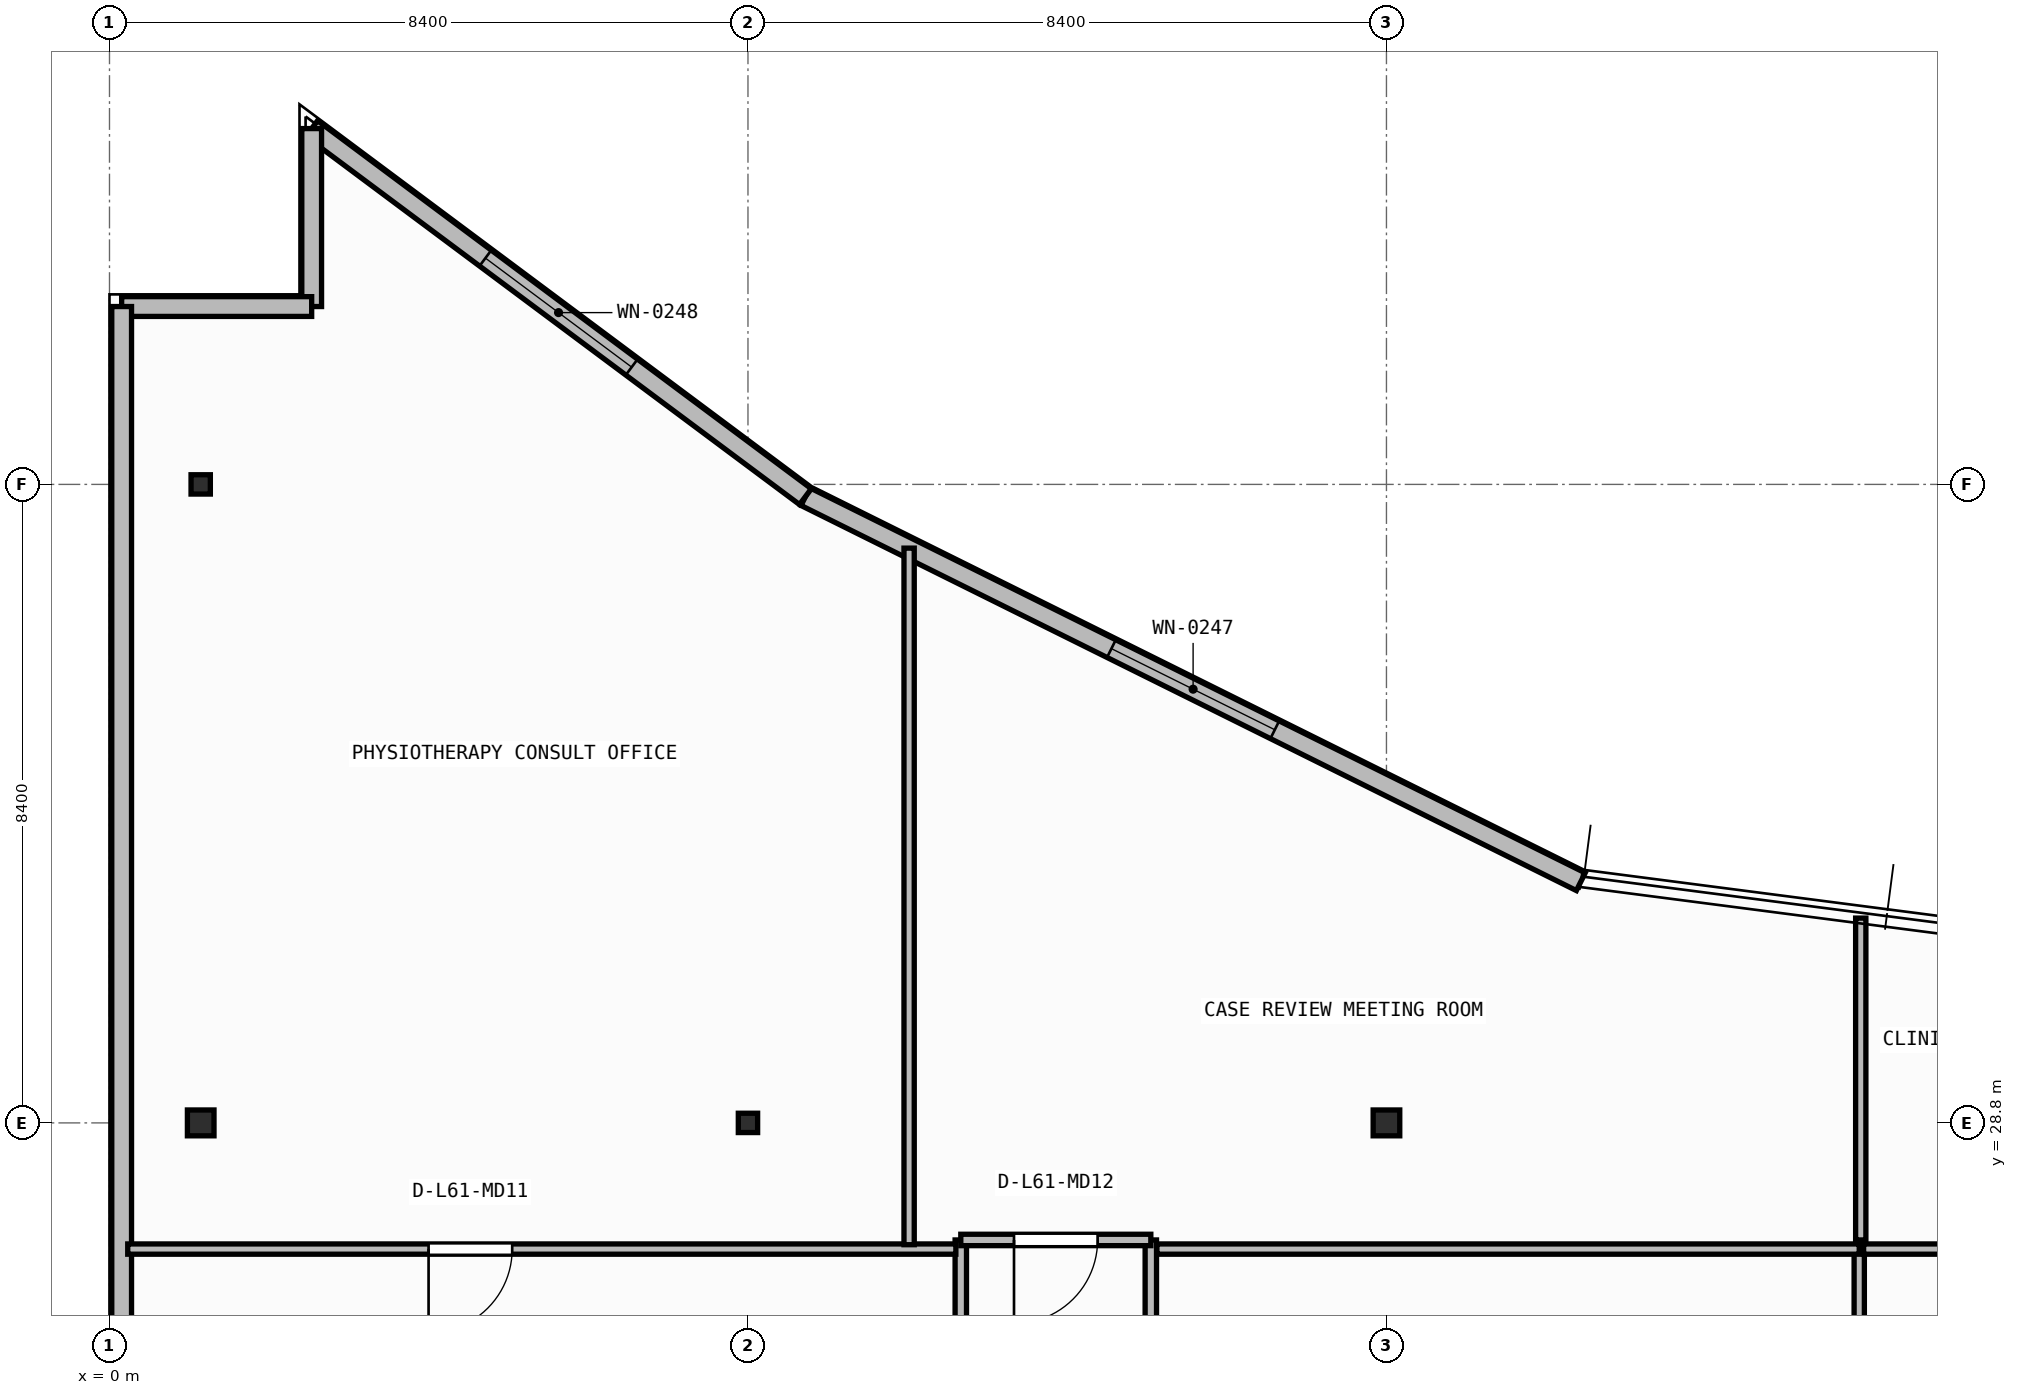
"""IFC4 building model, lengths in metres.
Left out: names, types, materials, properties, quantities, classifications, styles, units other than length and angle.
Written with IfcOpenShell. Run it as: python <this file> out.ifc"""

import sys

from ifc_helpers import new_model, si_unit, direction, frame, frame_2d, origin, origin_2d, place, context, subcontext, project, spatial, rectangle, i_section, extrude, element, fill, save


model = new_model("IFC4")
c1 = context("Model", 3, precision=1e-05, world=origin(), true_north=direction((0.0, 1.0)))
c2 = subcontext(c1, "Body", "Model", "MODEL_VIEW")
j1 = project(units=[si_unit("LENGTHUNIT", "METRE"), si_unit("PLANEANGLEUNIT", "RADIAN")], contexts=[c1])
p1 = place(None, origin())
s1 = spatial("IfcSite", under=j1, at=p1, CompositionType="ELEMENT")
p2 = place(p1, origin())
s2 = spatial("IfcBuilding", under=s1, at=p2, CompositionType="ELEMENT")
p3 = place(p2, frame((0.0, 0.0, 248.65)))
s3 = spatial("IfcBuildingStorey", under=s2, at=p3, CompositionType="ELEMENT", Elevation=248.65)
p4 = place(p3, frame((1.2, 28.8, 0.0), z_axis=(0.0, 0.0, 1.0), x_axis=(1.0, 0.0, 0.0)))
e1 = element("IfcColumn", 1, at=p4, inside=s3, PredefinedType="COLUMN", context=c2, shape_type="SweptSolid", body=[
    extrude(i_section(OverallWidth=0.35, OverallDepth=0.34, WebThickness=0.016, FlangeThickness=0.028, at=origin_2d()), origin(), (0.0, 0.0, 1.0), 3.95),
])
p5 = place(p3, frame((8.4, 28.8, 0.0), z_axis=(0.0, 0.0, 1.0), x_axis=(1.0, 0.0, 0.0)))
e2 = element("IfcColumn", 2, at=p5, inside=s3, PredefinedType="COLUMN", context=c2, shape_type="SweptSolid", body=[
    extrude(i_section(OverallWidth=0.254, OverallDepth=0.254, WebThickness=0.009, FlangeThickness=0.014, FilletRadius=0.013, at=origin_2d()), origin(), (0.0, 0.0, 1.0), 3.95),
])
p6 = place(p3, frame((16.8, 28.8, 0.0), z_axis=(0.0, 0.0, 1.0), x_axis=(1.0, 0.0, 0.0)))
e3 = element("IfcColumn", 3, at=p6, inside=s3, PredefinedType="COLUMN", context=c2, shape_type="SweptSolid", body=[
    extrude(i_section(OverallWidth=0.35, OverallDepth=0.34, WebThickness=0.016, FlangeThickness=0.028, at=origin_2d()), origin(), (0.0, 0.0, 1.0), 3.95),
])
p7 = place(p3, frame((1.2, 37.2, 0.0), z_axis=(0.0, 0.0, 1.0), x_axis=(1.0, 0.0, 0.0)))
e4 = element("IfcColumn", 4, at=p7, inside=s3, PredefinedType="COLUMN", context=c2, shape_type="SweptSolid", body=[
    extrude(i_section(OverallWidth=0.254, OverallDepth=0.254, WebThickness=0.009, FlangeThickness=0.014, FilletRadius=0.013, at=origin_2d()), origin(), (0.0, 0.0, 1.0), 3.95),
])
p8 = place(p3, frame((19.357, 31.973, 0.0), z_axis=(0.0, 0.0, 1.0), x_axis=(-0.895624365378, 0.444811191565, 0.0)))
e5 = element("IfcWall", 5, at=p8, inside=s3, PredefinedType="STANDARD", context=c2, shape_type="SweptSolid", body=[
    extrude(rectangle(XDim=11.389, YDim=0.26, at=frame_2d((5.695, 0.0))), origin(), (0.0, 0.0, 1.0), 3.71),
])
p9 = place(p8, frame((4.495, 0.0, 0.9)))
e6 = element("IfcOpeningElement", 6, at=p9, cuts=e5, PredefinedType="OPENING", context=c2, shape_type="SweptSolid", body=[
    extrude(rectangle(XDim=2.4, YDim=1.65, at=frame_2d((1.2, 0.825))), frame((0.0, 0.14, 0.0), z_axis=(0.0, -1.0, 0.0), x_axis=(1.0, 0.0, 0.0)), (0.0, 0.0, 1.0), 0.28),
])
p10 = place(p3, frame((9.156, 37.039, 0.0), z_axis=(0.0, 0.0, 1.0), x_axis=(-0.801775528243, 0.597625302602, 0.0)))
e7 = element("IfcWall", 7, at=p10, inside=s3, PredefinedType="STANDARD", context=c2, shape_type="SweptSolid", body=[
    extrude(rectangle(XDim=8.102, YDim=0.26, at=frame_2d((4.051, 0.0))), origin(), (0.0, 0.0, 1.0), 3.71),
])
p11 = place(p10, frame((2.851, 0.0, 0.9)))
e8 = element("IfcOpeningElement", 8, at=p11, cuts=e7, PredefinedType="OPENING", context=c2, shape_type="SweptSolid", body=[
    extrude(rectangle(XDim=2.4, YDim=1.65, at=frame_2d((1.2, 0.825))), frame((0.0, 0.14, 0.0), z_axis=(0.0, -1.0, 0.0), x_axis=(1.0, 0.0, 0.0)), (0.0, 0.0, 1.0), 0.28),
])
p12 = place(p3, frame((2.66, 41.881, 0.0), z_axis=(0.0, 0.0, 1.0), x_axis=(0.0, -1.0, 0.0)))
e9 = element("IfcWall", 9, at=p12, inside=s3, PredefinedType="STANDARD", context=c2, shape_type="SweptSolid", body=[
    extrude(rectangle(XDim=2.341, YDim=0.26, at=frame_2d((1.17, 0.0))), origin(), (0.0, 0.0, 1.0), 3.71),
])
p13 = place(p3, frame((2.66, 39.54, 0.0), z_axis=(0.0, 0.0, 1.0), x_axis=(-1.0, 0.0, 0.0)))
e10 = element("IfcWall", 10, at=p13, inside=s3, PredefinedType="STANDARD", context=c2, shape_type="SweptSolid", body=[
    extrude(rectangle(XDim=2.5, YDim=0.26, at=frame_2d((1.25, 0.0))), origin(), (0.0, 0.0, 1.0), 3.71),
])
p14 = place(p3, frame((0.16, 39.54, 0.0), z_axis=(0.0, 0.0, 1.0), x_axis=(0.0, -1.0, 0.0)))
e11 = element("IfcWall", 11, at=p14, inside=s3, PredefinedType="STANDARD", context=c2, shape_type="SweptSolid", body=[
    extrude(rectangle(XDim=36.88, YDim=0.26, at=frame_2d((18.44, 0.0))), origin(), (0.0, 0.0, 1.0), 3.71),
])
p15 = place(p14, frame((26.625, 0.0, 0.9)))
e12 = element("IfcOpeningElement", 12, at=p15, cuts=e11, PredefinedType="OPENING", context=c2, shape_type="SweptSolid", body=[
    extrude(rectangle(XDim=2.4, YDim=1.65, at=frame_2d((1.2, 0.825))), frame((0.0, 0.14, 0.0), z_axis=(0.0, -1.0, 0.0), x_axis=(1.0, 0.0, 0.0)), (0.0, 0.0, 1.0), 0.28),
])
p16 = place(p3, frame((11.2, 27.26, 0.0), z_axis=(0.0, 0.0, 1.0), x_axis=(0.0, -1.0, 0.0)))
e13 = element("IfcWall", 13, at=p16, inside=s3, PredefinedType="PARTITIONING", context=c2, shape_type="SweptSolid", body=[
    extrude(rectangle(XDim=6.242, YDim=0.15, at=frame_2d((3.121, 0.0))), origin(), (0.0, 0.0, 1.0), 3.71),
])
p17 = place(p16, frame((2.571, 0.0, 0.0)))
e14 = element("IfcOpeningElement", 14, at=p17, cuts=e13, PredefinedType="OPENING", context=c2, shape_type="SweptSolid", body=[
    extrude(rectangle(XDim=1.1, YDim=2.1, at=frame_2d((0.55, 1.05))), frame((0.0, 0.085, 0.0), z_axis=(0.0, -1.0, 0.0), x_axis=(1.0, 0.0, 0.0)), (0.0, 0.0, 1.0), 0.17),
])
p18 = place(p3, frame((13.7, 21.018, 0.0), z_axis=(0.0, 0.0, 1.0), x_axis=(0.0, 1.0, 0.0)))
e15 = element("IfcWall", 15, at=p18, inside=s3, PredefinedType="PARTITIONING", context=c2, shape_type="SweptSolid", body=[
    extrude(rectangle(XDim=6.242, YDim=0.15, at=frame_2d((3.121, 0.0))), origin(), (0.0, 0.0, 1.0), 3.71),
])
p19 = place(p18, frame((2.571, 0.0, 0.0)))
e16 = element("IfcOpeningElement", 16, at=p19, cuts=e15, PredefinedType="OPENING", context=c2, shape_type="SweptSolid", body=[
    extrude(rectangle(XDim=1.1, YDim=2.1, at=frame_2d((0.55, 1.05))), frame((0.0, 0.085, 0.0), z_axis=(0.0, -1.0, 0.0), x_axis=(1.0, 0.0, 0.0)), (0.0, 0.0, 1.0), 0.17),
])
p20 = place(p3, frame((13.7, 27.26, 0.0), z_axis=(0.0, 0.0, 1.0), x_axis=(-1.0, 0.0, 0.0)))
e17 = element("IfcWall", 17, at=p20, inside=s3, PredefinedType="PARTITIONING", context=c2, shape_type="SweptSolid", body=[
    extrude(rectangle(XDim=2.5, YDim=0.15, at=frame_2d((1.25, 0.0))), origin(), (0.0, 0.0, 1.0), 3.71),
])
p21 = place(p20, frame((0.7, 0.0, 0.0)))
e18 = element("IfcOpeningElement", 18, at=p21, cuts=e17, PredefinedType="OPENING", context=c2, shape_type="SweptSolid", body=[
    extrude(rectangle(XDim=1.1, YDim=2.1, at=frame_2d((0.55, 1.05))), frame((0.0, 0.085, 0.0), z_axis=(0.0, -1.0, 0.0), x_axis=(1.0, 0.0, 0.0)), (0.0, 0.0, 1.0), 0.17),
])
p22 = place(p3, frame((11.135, 27.14, 0.0), z_axis=(0.0, 0.0, 1.0), x_axis=(-1.0, 0.0, 0.0)))
e19 = element("IfcWall", 19, at=p22, inside=s3, PredefinedType="PARTITIONING", context=c2, shape_type="SweptSolid", body=[
    extrude(rectangle(XDim=10.895, YDim=0.135, at=frame_2d((5.448, 0.0))), origin(), (0.0, 0.0, 1.0), 3.71),
])
p23 = place(p22, frame((5.837, 0.0, 0.0)))
e20 = element("IfcOpeningElement", 20, at=p23, cuts=e19, PredefinedType="OPENING", context=c2, shape_type="SweptSolid", body=[
    extrude(rectangle(XDim=1.1, YDim=2.1, at=frame_2d((0.55, 1.05))), frame((0.0, 0.077, 0.0), z_axis=(0.0, -1.0, 0.0), x_axis=(1.0, 0.0, 0.0)), (0.0, 0.0, 1.0), 0.155),
])
p24 = place(p3, frame((23.02, 20.847, 0.0), z_axis=(0.0, 0.0, 1.0), x_axis=(0.0, 1.0, 0.0)))
e21 = element("IfcWall", 21, at=p24, inside=s3, PredefinedType="PARTITIONING", context=c2, shape_type="SweptSolid", body=[
    extrude(rectangle(XDim=6.292, YDim=0.135, at=frame_2d((3.146, 0.0))), origin(), (0.0, 0.0, 1.0), 3.71),
])
p25 = place(p3, frame((23.02, 27.14, 0.0), z_axis=(0.0, 0.0, 1.0), x_axis=(-1.0, 0.0, 0.0)))
e22 = element("IfcWall", 22, at=p25, inside=s3, PredefinedType="PARTITIONING", context=c2, shape_type="SweptSolid", body=[
    extrude(rectangle(XDim=9.24, YDim=0.135, at=frame_2d((4.62, 0.0))), origin(), (0.0, 0.0, 1.0), 3.71),
])
p26 = place(p3, frame((33.86, 27.14, 0.0), z_axis=(0.0, 0.0, 1.0), x_axis=(-1.0, 0.0, 0.0)))
e23 = element("IfcWall", 23, at=p26, inside=s3, PredefinedType="PARTITIONING", context=c2, shape_type="SweptSolid", body=[
    extrude(rectangle(XDim=10.783, YDim=0.135, at=frame_2d((5.391, 0.0))), origin(), (0.0, 0.0, 1.0), 3.71),
])
p27 = place(p26, frame((3.913, 0.0, 0.0)))
e24 = element("IfcOpeningElement", 24, at=p27, cuts=e23, PredefinedType="OPENING", context=c2, shape_type="SweptSolid", body=[
    extrude(rectangle(XDim=1.1, YDim=2.1, at=frame_2d((0.55, 1.05))), frame((0.0, 0.077, 0.0), z_axis=(0.0, -1.0, 0.0), x_axis=(1.0, 0.0, 0.0)), (0.0, 0.0, 1.0), 0.155),
])
p28 = place(p3, frame((10.52, 27.198, 0.0), z_axis=(0.0, 0.0, 1.0), x_axis=(0.0, 1.0, 0.0)))
e25 = element("IfcWall", 25, at=p28, inside=s3, PredefinedType="PARTITIONING", context=c2, shape_type="SweptSolid", body=[
    extrude(rectangle(XDim=9.164, YDim=0.135, at=frame_2d((4.582, 0.0))), origin(), (0.0, 0.0, 1.0), 3.71),
])
p29 = place(p3, frame((23.04, 27.26, 0.0), z_axis=(0.0, 0.0, 1.0), x_axis=(0.0, 1.0, 0.0)))
e26 = element("IfcWall", 26, at=p29, inside=s3, PredefinedType="PARTITIONING", context=c2, shape_type="SweptSolid", body=[
    extrude(rectangle(XDim=4.234, YDim=0.135, at=frame_2d((2.117, 0.0))), origin(), (0.0, 0.0, 1.0), 3.71),
])
p30 = place(p9, origin())
e27 = element("IfcWindow", 27, at=p30, inside=s3, PartitioningType="SINGLE_PANEL", PredefinedType="WINDOW", context=c2, shape_type="SweptSolid", body=[
    extrude(rectangle(XDim=2.4, YDim=1.65, at=frame_2d((1.2, 0.825))), frame((0.0, 0.03, 0.0), z_axis=(0.0, -1.0, 0.0), x_axis=(1.0, 0.0, 0.0)), (0.0, 0.0, 1.0), 0.06),
])
fill(e6, e27)
p31 = place(p11, origin())
e28 = element("IfcWindow", 28, at=p31, inside=s3, PartitioningType="SINGLE_PANEL", PredefinedType="WINDOW", context=c2, shape_type="SweptSolid", body=[
    extrude(rectangle(XDim=2.4, YDim=1.65, at=frame_2d((1.2, 0.825))), frame((0.0, 0.03, 0.0), z_axis=(0.0, -1.0, 0.0), x_axis=(1.0, 0.0, 0.0)), (0.0, 0.0, 1.0), 0.06),
])
fill(e8, e28)
p32 = place(p21, origin())
e29 = element("IfcDoor", 29, at=p32, inside=s3, OperationType="SINGLE_SWING_RIGHT", PredefinedType="DOOR", context=c2, shape_type="SweptSolid", body=[
    extrude(rectangle(XDim=1.1, YDim=2.1, at=frame_2d((0.55, 1.05))), frame((0.0, 0.025, 0.0), z_axis=(0.0, -1.0, 0.0), x_axis=(1.0, 0.0, 0.0)), (0.0, 0.0, 1.0), 0.05),
])
fill(e18, e29)
p33 = place(p23, origin())
e30 = element("IfcDoor", 30, at=p33, inside=s3, OperationType="SINGLE_SWING_RIGHT", PredefinedType="DOOR", context=c2, shape_type="SweptSolid", body=[
    extrude(rectangle(XDim=1.1, YDim=2.1, at=frame_2d((0.55, 1.05))), frame((0.0, 0.025, 0.0), z_axis=(0.0, -1.0, 0.0), x_axis=(1.0, 0.0, 0.0)), (0.0, 0.0, 1.0), 0.05),
])
fill(e20, e30)
save(model, sys.argv[1])
